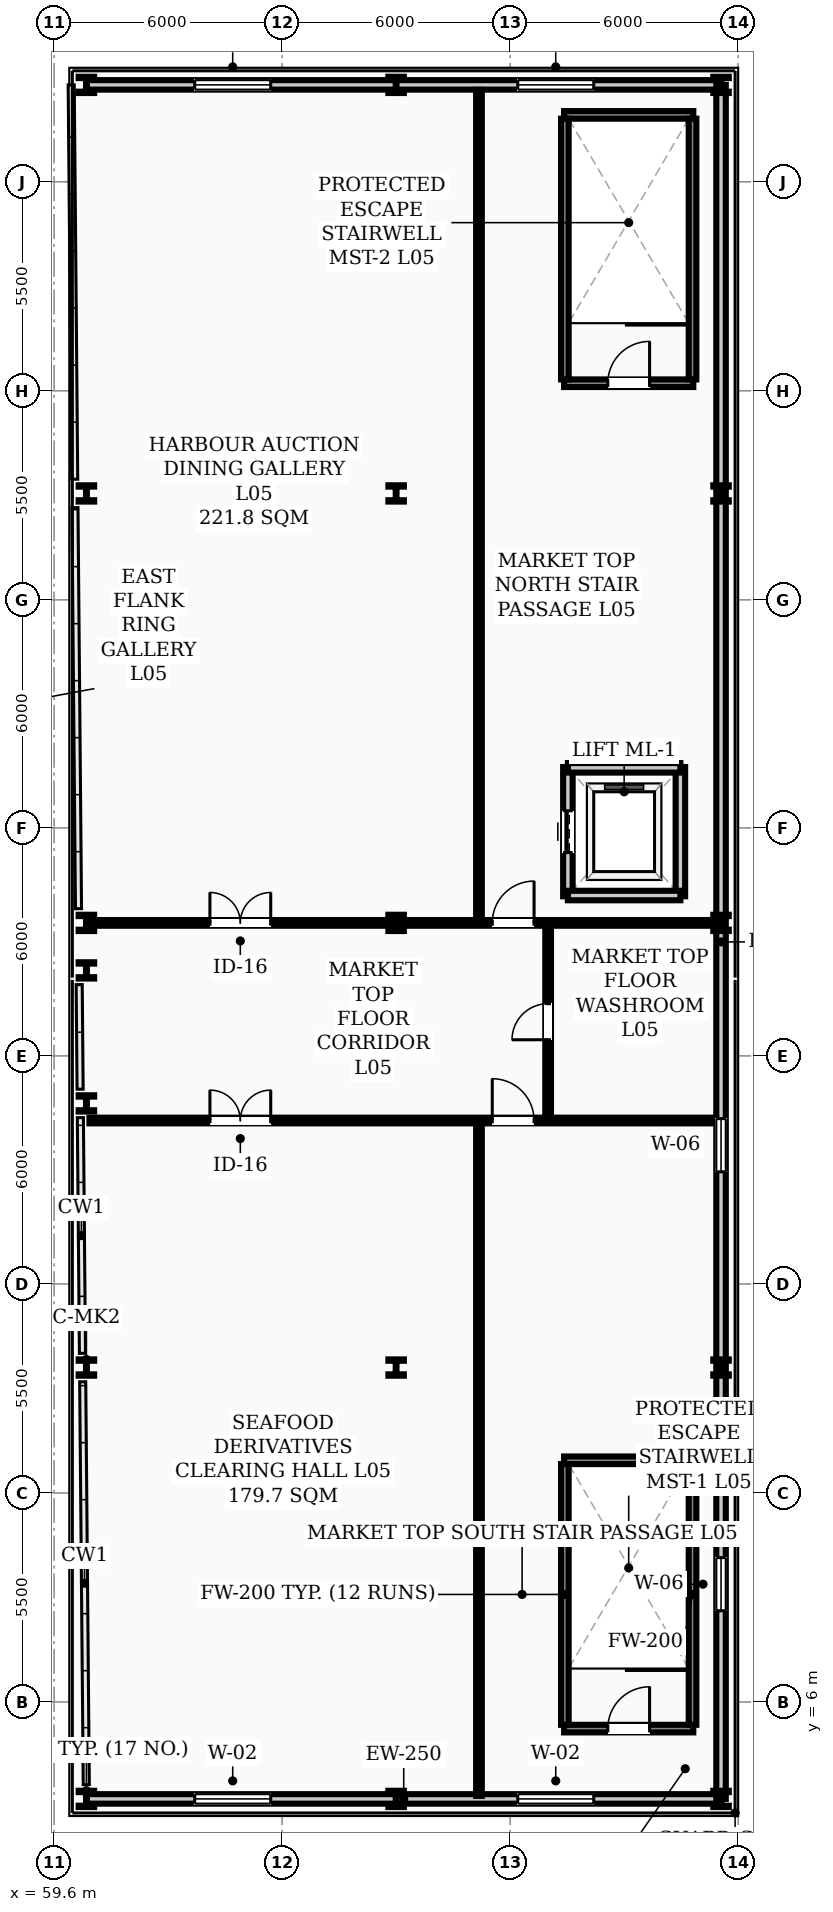
"""IFC4 building model, lengths in metres.
Left out: names, types, materials, properties, quantities, classifications, styles, units other than length and angle.
Written with IfcOpenShell. Run it as: python <this file> out.ifc"""

import sys

from ifc_helpers import new_model, si_unit, direction, frame, frame_2d, origin, origin_2d, place, context, subcontext, project, spatial, rectangle, i_section, extrude, element, fill, save


model = new_model("IFC4")
c1 = context("Model", 3, precision=1e-05, world=origin(), true_north=direction((0.0, 1.0)))
c2 = subcontext(c1, "Body", "Model", "MODEL_VIEW")
j1 = project(units=[si_unit("LENGTHUNIT", "METRE"), si_unit("PLANEANGLEUNIT", "RADIAN")], contexts=[c1])
p1 = place(None, origin())
s1 = spatial("IfcSite", under=j1, at=p1, CompositionType="ELEMENT")
p2 = place(p1, origin())
s2 = spatial("IfcBuilding", under=s1, at=p2, CompositionType="ELEMENT")
p3 = place(p2, frame((0.0, 0.0, 22.0)))
s3 = spatial("IfcBuildingStorey", under=s2, at=p3, CompositionType="ELEMENT", Elevation=22.0)
for number, where, z_axis, x_axis in (
    (1, (60.45, 3.45, 0.0), (0.0, 0.0, 1.0), (1.0, 0.0, 0.0)),
    (2, (60.45, 14.8, 0.0), (0.0, 0.0, 1.0), (1.0, 0.0, 0.0)),
    (3, (60.45, 21.75, 0.0), (0.0, 0.0, 1.0), (1.0, 0.0, 0.0)),
    (4, (60.45, 25.25, 0.0), (0.0, 0.0, 1.0), (1.0, 0.0, 0.0)),
    (5, (60.45, 26.5, 0.0), (0.0, 0.0, 1.0), (1.0, 0.0, 0.0)),
    (6, (60.45, 37.8, 0.0), (0.0, 0.0, 1.0), (1.0, 0.0, 0.0)),
    (7, (60.45, 48.55, 0.0), (0.0, 0.0, 1.0), (1.0, 0.0, 0.0)),
    (8, (68.6, 3.45, 0.0), (0.0, 0.0, 1.0), (1.0, 0.0, 0.0)),
    (9, (68.6, 14.8, 0.0), (0.0, 0.0, 1.0), (1.0, 0.0, 0.0)),
    (10, (68.6, 26.5, 0.0), (0.0, 0.0, 1.0), (1.0, 0.0, 0.0)),
    (11, (68.6, 37.8, 0.0), (0.0, 0.0, 1.0), (1.0, 0.0, 0.0)),
    (12, (68.6, 48.55, 0.0), (0.0, 0.0, 1.0), (1.0, 0.0, 0.0)),
    (13, (77.15, 3.45, 0.0), (0.0, 0.0, 1.0), (1.0, 0.0, 0.0)),
    (14, (77.15, 14.8, 0.0), (0.0, 0.0, 1.0), (1.0, 0.0, 0.0)),
    (15, (77.15, 26.5, 0.0), (0.0, 0.0, 1.0), (1.0, 0.0, 0.0)),
    (16, (77.15, 37.8, 0.0), (0.0, 0.0, 1.0), (1.0, 0.0, 0.0)),
    (17, (77.15, 48.55, 0.0), (0.0, 0.0, 1.0), (1.0, 0.0, 0.0)),
):
    element("IfcColumn", number, at=place(p3, frame(where, z_axis=z_axis, x_axis=x_axis)), inside=s3, PredefinedType="COLUMN", context=c2, shape_type="SweptSolid", body=[
        extrude(i_section(OverallWidth=0.407, OverallDepth=0.428, WebThickness=0.02, FlangeThickness=0.035, FilletRadius=0.022, at=origin_2d()), origin(), (0.0, 0.0, 1.0), 4.29),
    ])
p4 = place(p3, frame((60.45, 3.45, 0.0), z_axis=(0.0, 0.0, 1.0), x_axis=(1.0, 0.0, 0.0)))
e18 = element("IfcWall", 18, at=p4, inside=s3, PredefinedType="STANDARD", context=c2, shape_type="SweptSolid", body=[
    extrude(rectangle(XDim=16.7, YDim=0.25, at=frame_2d((8.35, 0.0))), origin(), (0.0, 0.0, 1.0), 3.67),
])
p5 = place(p4, frame((2.85, 0.0, 0.95)))
e19 = element("IfcOpeningElement", 19, at=p5, cuts=e18, PredefinedType="OPENING", context=c2, shape_type="SweptSolid", body=[
    extrude(rectangle(XDim=2.0, YDim=1.8, at=frame_2d((1.0, 0.9))), frame((0.0, 0.135, 0.0), z_axis=(0.0, -1.0, 0.0), x_axis=(1.0, 0.0, 0.0)), (0.0, 0.0, 1.0), 0.27),
])
p6 = place(p4, frame((11.35, 0.0, 0.95)))
e20 = element("IfcOpeningElement", 20, at=p6, cuts=e18, PredefinedType="OPENING", context=c2, shape_type="SweptSolid", body=[
    extrude(rectangle(XDim=2.0, YDim=1.8, at=frame_2d((1.0, 0.9))), frame((0.0, 0.135, 0.0), z_axis=(0.0, -1.0, 0.0), x_axis=(1.0, 0.0, 0.0)), (0.0, 0.0, 1.0), 0.27),
])
p7 = place(p3, frame((60.45, 48.55, 0.0), z_axis=(0.0, 0.0, 1.0), x_axis=(1.0, 0.0, 0.0)))
e21 = element("IfcWall", 21, at=p7, inside=s3, PredefinedType="STANDARD", context=c2, shape_type="SweptSolid", body=[
    extrude(rectangle(XDim=16.7, YDim=0.25, at=frame_2d((8.35, 0.0))), origin(), (0.0, 0.0, 1.0), 3.67),
])
p8 = place(p7, frame((2.85, 0.0, 0.95)))
e22 = element("IfcOpeningElement", 22, at=p8, cuts=e21, PredefinedType="OPENING", context=c2, shape_type="SweptSolid", body=[
    extrude(rectangle(XDim=2.0, YDim=1.8, at=frame_2d((1.0, 0.9))), frame((0.0, 0.135, 0.0), z_axis=(0.0, -1.0, 0.0), x_axis=(1.0, 0.0, 0.0)), (0.0, 0.0, 1.0), 0.27),
])
p9 = place(p7, frame((11.35, 0.0, 0.95)))
e23 = element("IfcOpeningElement", 23, at=p9, cuts=e21, PredefinedType="OPENING", context=c2, shape_type="SweptSolid", body=[
    extrude(rectangle(XDim=2.0, YDim=1.8, at=frame_2d((1.0, 0.9))), frame((0.0, 0.135, 0.0), z_axis=(0.0, -1.0, 0.0), x_axis=(1.0, 0.0, 0.0)), (0.0, 0.0, 1.0), 0.27),
])
p10 = place(p3, frame((77.15, 3.45, 0.0), z_axis=(0.0, 0.0, 1.0), x_axis=(0.0, 1.0, 0.0)))
e24 = element("IfcWall", 24, at=p10, inside=s3, PredefinedType="STANDARD", context=c2, shape_type="SweptSolid", body=[
    extrude(rectangle(XDim=45.1, YDim=0.25, at=frame_2d((22.55, 0.0))), origin(), (0.0, 0.0, 1.0), 3.67),
])
p11 = place(p10, frame((4.95, 0.0, 0.95)))
e25 = element("IfcOpeningElement", 25, at=p11, cuts=e24, PredefinedType="OPENING", context=c2, shape_type="SweptSolid", body=[
    extrude(rectangle(XDim=1.4, YDim=1.4, at=frame_2d((0.7, 0.7))), frame((0.0, 0.135, 0.0), z_axis=(0.0, -1.0, 0.0), x_axis=(1.0, 0.0, 0.0)), (0.0, 0.0, 1.0), 0.27),
])
p12 = place(p10, frame((16.5, 0.0, 0.95)))
e26 = element("IfcOpeningElement", 26, at=p12, cuts=e24, PredefinedType="OPENING", context=c2, shape_type="SweptSolid", body=[
    extrude(rectangle(XDim=1.4, YDim=1.4, at=frame_2d((0.7, 0.7))), frame((0.0, 0.135, 0.0), z_axis=(0.0, -1.0, 0.0), x_axis=(1.0, 0.0, 0.0)), (0.0, 0.0, 1.0), 0.27),
])
p13 = place(p3, frame((73.02, 5.3, 0.0), z_axis=(0.0, 0.0, 1.0), x_axis=(1.0, 0.0, 0.0)))
e27 = element("IfcWall", 27, at=p13, inside=s3, PredefinedType="STANDARD", context=c2, shape_type="SweptSolid", body=[
    extrude(rectangle(XDim=3.4, YDim=0.2, at=frame_2d((1.7, 0.0))), origin(), (0.0, 0.0, 1.0), 4.32),
])
p14 = place(p13, frame((1.15, 0.0, 0.0)))
e28 = element("IfcOpeningElement", 28, at=p14, cuts=e27, PredefinedType="OPENING", context=c2, shape_type="SweptSolid", body=[
    extrude(rectangle(XDim=1.1, YDim=2.08, at=frame_2d((0.55, 1.04))), frame((0.0, 0.11, 0.0), z_axis=(0.0, -1.0, 0.0), x_axis=(1.0, 0.0, 0.0)), (0.0, 0.0, 1.0), 0.22),
])
p15 = place(p3, frame((73.02, 12.36, 0.0), z_axis=(0.0, 0.0, 1.0), x_axis=(1.0, 0.0, 0.0)))
e29 = element("IfcWall", 29, at=p15, inside=s3, PredefinedType="STANDARD", context=c2, shape_type="SweptSolid", body=[
    extrude(rectangle(XDim=3.4, YDim=0.2, at=frame_2d((1.7, 0.0))), origin(), (0.0, 0.0, 1.0), 4.32),
])
for number, where, z_axis, x_axis in (
    (30, (73.04, 5.4, 0.0), (0.0, 0.0, 1.0), (0.0, 1.0, 0.0)),
    (31, (76.4, 5.4, 0.0), (0.0, 0.0, 1.0), (0.0, 1.0, 0.0)),
):
    element("IfcWall", number, at=place(p3, frame(where, z_axis=z_axis, x_axis=x_axis)), inside=s3, PredefinedType="STANDARD", context=c2, shape_type="SweptSolid", body=[
        extrude(rectangle(XDim=6.86, YDim=0.2, at=frame_2d((3.43, 0.0))), origin(), (0.0, 0.0, 1.0), 4.32),
    ])
p16 = place(p3, frame((73.02, 40.7, 0.0), z_axis=(0.0, 0.0, 1.0), x_axis=(1.0, 0.0, 0.0)))
e32 = element("IfcWall", 32, at=p16, inside=s3, PredefinedType="STANDARD", context=c2, shape_type="SweptSolid", body=[
    extrude(rectangle(XDim=3.4, YDim=0.2, at=frame_2d((1.7, 0.0))), origin(), (0.0, 0.0, 1.0), 4.32),
])
p17 = place(p16, frame((1.15, 0.0, 0.0)))
e33 = element("IfcOpeningElement", 33, at=p17, cuts=e32, PredefinedType="OPENING", context=c2, shape_type="SweptSolid", body=[
    extrude(rectangle(XDim=1.1, YDim=2.08, at=frame_2d((0.55, 1.04))), frame((0.0, 0.11, 0.0), z_axis=(0.0, -1.0, 0.0), x_axis=(1.0, 0.0, 0.0)), (0.0, 0.0, 1.0), 0.22),
])
p18 = place(p3, frame((73.02, 47.76, 0.0), z_axis=(0.0, 0.0, 1.0), x_axis=(1.0, 0.0, 0.0)))
e34 = element("IfcWall", 34, at=p18, inside=s3, PredefinedType="STANDARD", context=c2, shape_type="SweptSolid", body=[
    extrude(rectangle(XDim=3.4, YDim=0.2, at=frame_2d((1.7, 0.0))), origin(), (0.0, 0.0, 1.0), 4.32),
])
for number, where, z_axis, x_axis in (
    (35, (73.04, 40.8, 0.0), (0.0, 0.0, 1.0), (0.0, 1.0, 0.0)),
    (36, (76.4, 40.8, 0.0), (0.0, 0.0, 1.0), (0.0, 1.0, 0.0)),
):
    element("IfcWall", number, at=place(p3, frame(where, z_axis=z_axis, x_axis=x_axis)), inside=s3, PredefinedType="STANDARD", context=c2, shape_type="SweptSolid", body=[
        extrude(rectangle(XDim=6.86, YDim=0.2, at=frame_2d((3.43, 0.0))), origin(), (0.0, 0.0, 1.0), 4.32),
    ])
p19 = place(p3, frame((73.12, 27.2, 0.0), z_axis=(0.0, 0.0, 1.0), x_axis=(0.0, 1.0, 0.0)))
e37 = element("IfcWall", 37, at=p19, inside=s3, PredefinedType="STANDARD", context=c2, shape_type="SweptSolid", body=[
    extrude(rectangle(XDim=3.4, YDim=0.25, at=frame_2d((1.7, 0.0))), origin(), (0.0, 0.0, 1.0), 3.92),
])
p20 = place(p19, frame((1.15, 0.0, 0.0)))
e38 = element("IfcOpeningElement", 38, at=p20, cuts=e37, PredefinedType="OPENING", context=c2, shape_type="SweptSolid", body=[
    extrude(rectangle(XDim=1.1, YDim=2.08, at=frame_2d((0.55, 1.04))), frame((0.0, 0.135, 0.0), z_axis=(0.0, -1.0, 0.0), x_axis=(1.0, 0.0, 0.0)), (0.0, 0.0, 1.0), 0.27),
])
p21 = place(p3, frame((76.08, 27.2, 0.0), z_axis=(0.0, 0.0, 1.0), x_axis=(0.0, 1.0, 0.0)))
e39 = element("IfcWall", 39, at=p21, inside=s3, PredefinedType="STANDARD", context=c2, shape_type="SweptSolid", body=[
    extrude(rectangle(XDim=3.4, YDim=0.25, at=frame_2d((1.7, 0.0))), origin(), (0.0, 0.0, 1.0), 3.92),
])
for number, where, z_axis, x_axis in (
    (40, (73.12, 27.22, 0.0), (0.0, 0.0, 1.0), (1.0, 0.0, 0.0)),
    (41, (73.12, 30.58, 0.0), (0.0, 0.0, 1.0), (1.0, 0.0, 0.0)),
):
    element("IfcWall", number, at=place(p3, frame(where, z_axis=z_axis, x_axis=x_axis)), inside=s3, PredefinedType="STANDARD", context=c2, shape_type="SweptSolid", body=[
        extrude(rectangle(XDim=2.96, YDim=0.25, at=frame_2d((1.48, 0.0))), origin(), (0.0, 0.0, 1.0), 3.92),
    ])
p22 = place(p3, frame((60.53, 21.3, 0.0), z_axis=(0.0, 0.0, 1.0), x_axis=(1.0, 0.0, 0.0)))
e42 = element("IfcWall", 42, at=p22, inside=s3, PredefinedType="PARTITIONING", context=c2, shape_type="SweptSolid", body=[
    extrude(rectangle(XDim=16.49, YDim=0.15, at=frame_2d((8.245, 0.0))), origin(), (0.0, 0.0, 1.0), 3.62),
])
p23 = place(p22, frame((3.17, 0.0, 0.0)))
e43 = element("IfcOpeningElement", 43, at=p23, cuts=e42, PredefinedType="OPENING", context=c2, shape_type="SweptSolid", body=[
    extrude(rectangle(XDim=1.6, YDim=2.08, at=frame_2d((0.8, 1.04))), frame((0.0, 0.085, 0.0), z_axis=(0.0, -1.0, 0.0), x_axis=(1.0, 0.0, 0.0)), (0.0, 0.0, 1.0), 0.17),
])
p24 = place(p22, frame((10.6, 0.0, 0.0)))
e44 = element("IfcOpeningElement", 44, at=p24, cuts=e42, PredefinedType="OPENING", context=c2, shape_type="SweptSolid", body=[
    extrude(rectangle(XDim=1.1, YDim=2.08, at=frame_2d((0.55, 1.04))), frame((0.0, 0.085, 0.0), z_axis=(0.0, -1.0, 0.0), x_axis=(1.0, 0.0, 0.0)), (0.0, 0.0, 1.0), 0.17),
])
p25 = place(p3, frame((60.53, 26.5, 0.0), z_axis=(0.0, 0.0, 1.0), x_axis=(1.0, 0.0, 0.0)))
e45 = element("IfcWall", 45, at=p25, inside=s3, PredefinedType="PARTITIONING", context=c2, shape_type="SweptSolid", body=[
    extrude(rectangle(XDim=16.49, YDim=0.15, at=frame_2d((8.245, 0.0))), origin(), (0.0, 0.0, 1.0), 3.62),
])
p26 = place(p25, frame((3.17, 0.0, 0.0)))
e46 = element("IfcOpeningElement", 46, at=p26, cuts=e45, PredefinedType="OPENING", context=c2, shape_type="SweptSolid", body=[
    extrude(rectangle(XDim=1.6, YDim=2.08, at=frame_2d((0.8, 1.04))), frame((0.0, 0.085, 0.0), z_axis=(0.0, -1.0, 0.0), x_axis=(1.0, 0.0, 0.0)), (0.0, 0.0, 1.0), 0.17),
])
p27 = place(p25, frame((10.6, 0.0, 0.0)))
e47 = element("IfcOpeningElement", 47, at=p27, cuts=e45, PredefinedType="OPENING", context=c2, shape_type="SweptSolid", body=[
    extrude(rectangle(XDim=1.1, YDim=2.08, at=frame_2d((0.55, 1.04))), frame((0.0, 0.085, 0.0), z_axis=(0.0, -1.0, 0.0), x_axis=(1.0, 0.0, 0.0)), (0.0, 0.0, 1.0), 0.17),
])
p28 = place(p3, frame((72.6, 21.385, 0.0), z_axis=(0.0, 0.0, 1.0), x_axis=(0.0, 1.0, 0.0)))
e48 = element("IfcWall", 48, at=p28, inside=s3, PredefinedType="PARTITIONING", context=c2, shape_type="SweptSolid", body=[
    extrude(rectangle(XDim=5.03, YDim=0.15, at=frame_2d((2.515, 0.0))), origin(), (0.0, 0.0, 1.0), 3.62),
])
p29 = place(p28, frame((2.04, 0.0, 0.0)))
e49 = element("IfcOpeningElement", 49, at=p29, cuts=e48, PredefinedType="OPENING", context=c2, shape_type="SweptSolid", body=[
    extrude(rectangle(XDim=0.95, YDim=2.08, at=frame_2d((0.475, 1.04))), frame((0.0, 0.085, 0.0), z_axis=(0.0, -1.0, 0.0), x_axis=(1.0, 0.0, 0.0)), (0.0, 0.0, 1.0), 0.17),
])
p30 = place(p3, frame((70.78, 3.53, 0.0), z_axis=(0.0, 0.0, 1.0), x_axis=(0.0, 1.0, 0.0)))
e50 = element("IfcWall", 50, at=p30, inside=s3, PredefinedType="PARTITIONING", context=c2, shape_type="SweptSolid", body=[
    extrude(rectangle(XDim=17.685, YDim=0.15, at=frame_2d((8.843, 0.0))), origin(), (0.0, 0.0, 1.0), 3.62),
])
p31 = place(p3, frame((70.78, 26.585, 0.0), z_axis=(0.0, 0.0, 1.0), x_axis=(0.0, 1.0, 0.0)))
e51 = element("IfcWall", 51, at=p31, inside=s3, PredefinedType="PARTITIONING", context=c2, shape_type="SweptSolid", body=[
    extrude(rectangle(XDim=21.835, YDim=0.15, at=frame_2d((10.917, 0.0))), origin(), (0.0, 0.0, 1.0), 3.62),
])
p32 = place(p5, origin())
e52 = element("IfcWindow", 52, at=p32, inside=s3, PartitioningType="SINGLE_PANEL", PredefinedType="WINDOW", context=c2, shape_type="SweptSolid", body=[
    extrude(rectangle(XDim=2.0, YDim=1.8, at=frame_2d((1.0, 0.9))), frame((0.0, 0.03, 0.0), z_axis=(0.0, -1.0, 0.0), x_axis=(1.0, 0.0, 0.0)), (0.0, 0.0, 1.0), 0.06),
])
fill(e19, e52)
p33 = place(p8, origin())
e53 = element("IfcWindow", 53, at=p33, inside=s3, PartitioningType="SINGLE_PANEL", PredefinedType="WINDOW", context=c2, shape_type="SweptSolid", body=[
    extrude(rectangle(XDim=2.0, YDim=1.8, at=frame_2d((1.0, 0.9))), frame((0.0, 0.03, 0.0), z_axis=(0.0, -1.0, 0.0), x_axis=(1.0, 0.0, 0.0)), (0.0, 0.0, 1.0), 0.06),
])
fill(e22, e53)
p34 = place(p6, origin())
e54 = element("IfcWindow", 54, at=p34, inside=s3, PartitioningType="SINGLE_PANEL", PredefinedType="WINDOW", context=c2, shape_type="SweptSolid", body=[
    extrude(rectangle(XDim=2.0, YDim=1.8, at=frame_2d((1.0, 0.9))), frame((0.0, 0.03, 0.0), z_axis=(0.0, -1.0, 0.0), x_axis=(1.0, 0.0, 0.0)), (0.0, 0.0, 1.0), 0.06),
])
fill(e20, e54)
p35 = place(p9, origin())
e55 = element("IfcWindow", 55, at=p35, inside=s3, PartitioningType="SINGLE_PANEL", PredefinedType="WINDOW", context=c2, shape_type="SweptSolid", body=[
    extrude(rectangle(XDim=2.0, YDim=1.8, at=frame_2d((1.0, 0.9))), frame((0.0, 0.03, 0.0), z_axis=(0.0, -1.0, 0.0), x_axis=(1.0, 0.0, 0.0)), (0.0, 0.0, 1.0), 0.06),
])
fill(e23, e55)
p36 = place(p11, origin())
e56 = element("IfcWindow", 56, at=p36, inside=s3, PartitioningType="SINGLE_PANEL", PredefinedType="WINDOW", context=c2, shape_type="SweptSolid", body=[
    extrude(rectangle(XDim=1.4, YDim=1.4, at=frame_2d((0.7, 0.7))), frame((0.0, 0.03, 0.0), z_axis=(0.0, -1.0, 0.0), x_axis=(1.0, 0.0, 0.0)), (0.0, 0.0, 1.0), 0.06),
])
fill(e25, e56)
p37 = place(p12, origin())
e57 = element("IfcWindow", 57, at=p37, inside=s3, PartitioningType="SINGLE_PANEL", PredefinedType="WINDOW", context=c2, shape_type="SweptSolid", body=[
    extrude(rectangle(XDim=1.4, YDim=1.4, at=frame_2d((0.7, 0.7))), frame((0.0, 0.03, 0.0), z_axis=(0.0, -1.0, 0.0), x_axis=(1.0, 0.0, 0.0)), (0.0, 0.0, 1.0), 0.06),
])
fill(e26, e57)
p38 = place(p14, origin())
e58 = element("IfcDoor", 58, at=p38, inside=s3, OperationType="SINGLE_SWING_RIGHT", PredefinedType="DOOR", context=c2, shape_type="SweptSolid", body=[
    extrude(rectangle(XDim=1.1, YDim=2.08, at=frame_2d((0.55, 1.04))), frame((0.0, 0.025, 0.0), z_axis=(0.0, -1.0, 0.0), x_axis=(1.0, 0.0, 0.0)), (0.0, 0.0, 1.0), 0.05),
])
fill(e28, e58)
p39 = place(p17, origin())
e59 = element("IfcDoor", 59, at=p39, inside=s3, OperationType="SINGLE_SWING_RIGHT", PredefinedType="DOOR", context=c2, shape_type="SweptSolid", body=[
    extrude(rectangle(XDim=1.1, YDim=2.08, at=frame_2d((0.55, 1.04))), frame((0.0, 0.025, 0.0), z_axis=(0.0, -1.0, 0.0), x_axis=(1.0, 0.0, 0.0)), (0.0, 0.0, 1.0), 0.05),
])
fill(e33, e59)
p40 = place(p23, origin())
e60 = element("IfcDoor", 60, at=p40, inside=s3, OperationType="DOUBLE_DOOR_SINGLE_SWING", PredefinedType="DOOR", context=c2, shape_type="SweptSolid", body=[
    extrude(rectangle(XDim=1.6, YDim=2.08, at=frame_2d((0.8, 1.04))), frame((0.0, 0.025, 0.0), z_axis=(0.0, -1.0, 0.0), x_axis=(1.0, 0.0, 0.0)), (0.0, 0.0, 1.0), 0.05),
])
fill(e43, e60)
p41 = place(p26, origin())
e61 = element("IfcDoor", 61, at=p41, inside=s3, OperationType="DOUBLE_DOOR_SINGLE_SWING", PredefinedType="DOOR", context=c2, shape_type="SweptSolid", body=[
    extrude(rectangle(XDim=1.6, YDim=2.08, at=frame_2d((0.8, 1.04))), frame((0.0, 0.025, 0.0), z_axis=(0.0, -1.0, 0.0), x_axis=(1.0, 0.0, 0.0)), (0.0, 0.0, 1.0), 0.05),
])
fill(e46, e61)
p42 = place(p24, origin())
e62 = element("IfcDoor", 62, at=p42, inside=s3, OperationType="SINGLE_SWING_LEFT", PredefinedType="DOOR", context=c2, shape_type="SweptSolid", body=[
    extrude(rectangle(XDim=1.1, YDim=2.08, at=frame_2d((0.55, 1.04))), frame((0.0, 0.025, 0.0), z_axis=(0.0, -1.0, 0.0), x_axis=(1.0, 0.0, 0.0)), (0.0, 0.0, 1.0), 0.05),
])
fill(e44, e62)
p43 = place(p27, origin())
e63 = element("IfcDoor", 63, at=p43, inside=s3, OperationType="SINGLE_SWING_RIGHT", PredefinedType="DOOR", context=c2, shape_type="SweptSolid", body=[
    extrude(rectangle(XDim=1.1, YDim=2.08, at=frame_2d((0.55, 1.04))), frame((0.0, 0.025, 0.0), z_axis=(0.0, -1.0, 0.0), x_axis=(1.0, 0.0, 0.0)), (0.0, 0.0, 1.0), 0.05),
])
fill(e47, e63)
p44 = place(p29, origin())
e64 = element("IfcDoor", 64, at=p44, inside=s3, OperationType="SINGLE_SWING_LEFT", PredefinedType="DOOR", context=c2, shape_type="SweptSolid", body=[
    extrude(rectangle(XDim=0.95, YDim=2.08, at=frame_2d((0.475, 1.04))), frame((0.0, 0.025, 0.0), z_axis=(0.0, -1.0, 0.0), x_axis=(1.0, 0.0, 0.0)), (0.0, 0.0, 1.0), 0.05),
])
fill(e49, e64)
p45 = place(p20, origin())
e65 = element("IfcDoor", 65, at=p45, inside=s3, OperationType="SLIDING_TO_LEFT", PredefinedType="DOOR", context=c2, shape_type="SweptSolid", body=[
    extrude(rectangle(XDim=1.1, YDim=2.08, at=frame_2d((0.55, 1.04))), frame((0.0, 0.025, 0.0), z_axis=(0.0, -1.0, 0.0), x_axis=(1.0, 0.0, 0.0)), (0.0, 0.0, 1.0), 0.05),
])
fill(e38, e65)
save(model, sys.argv[1])
